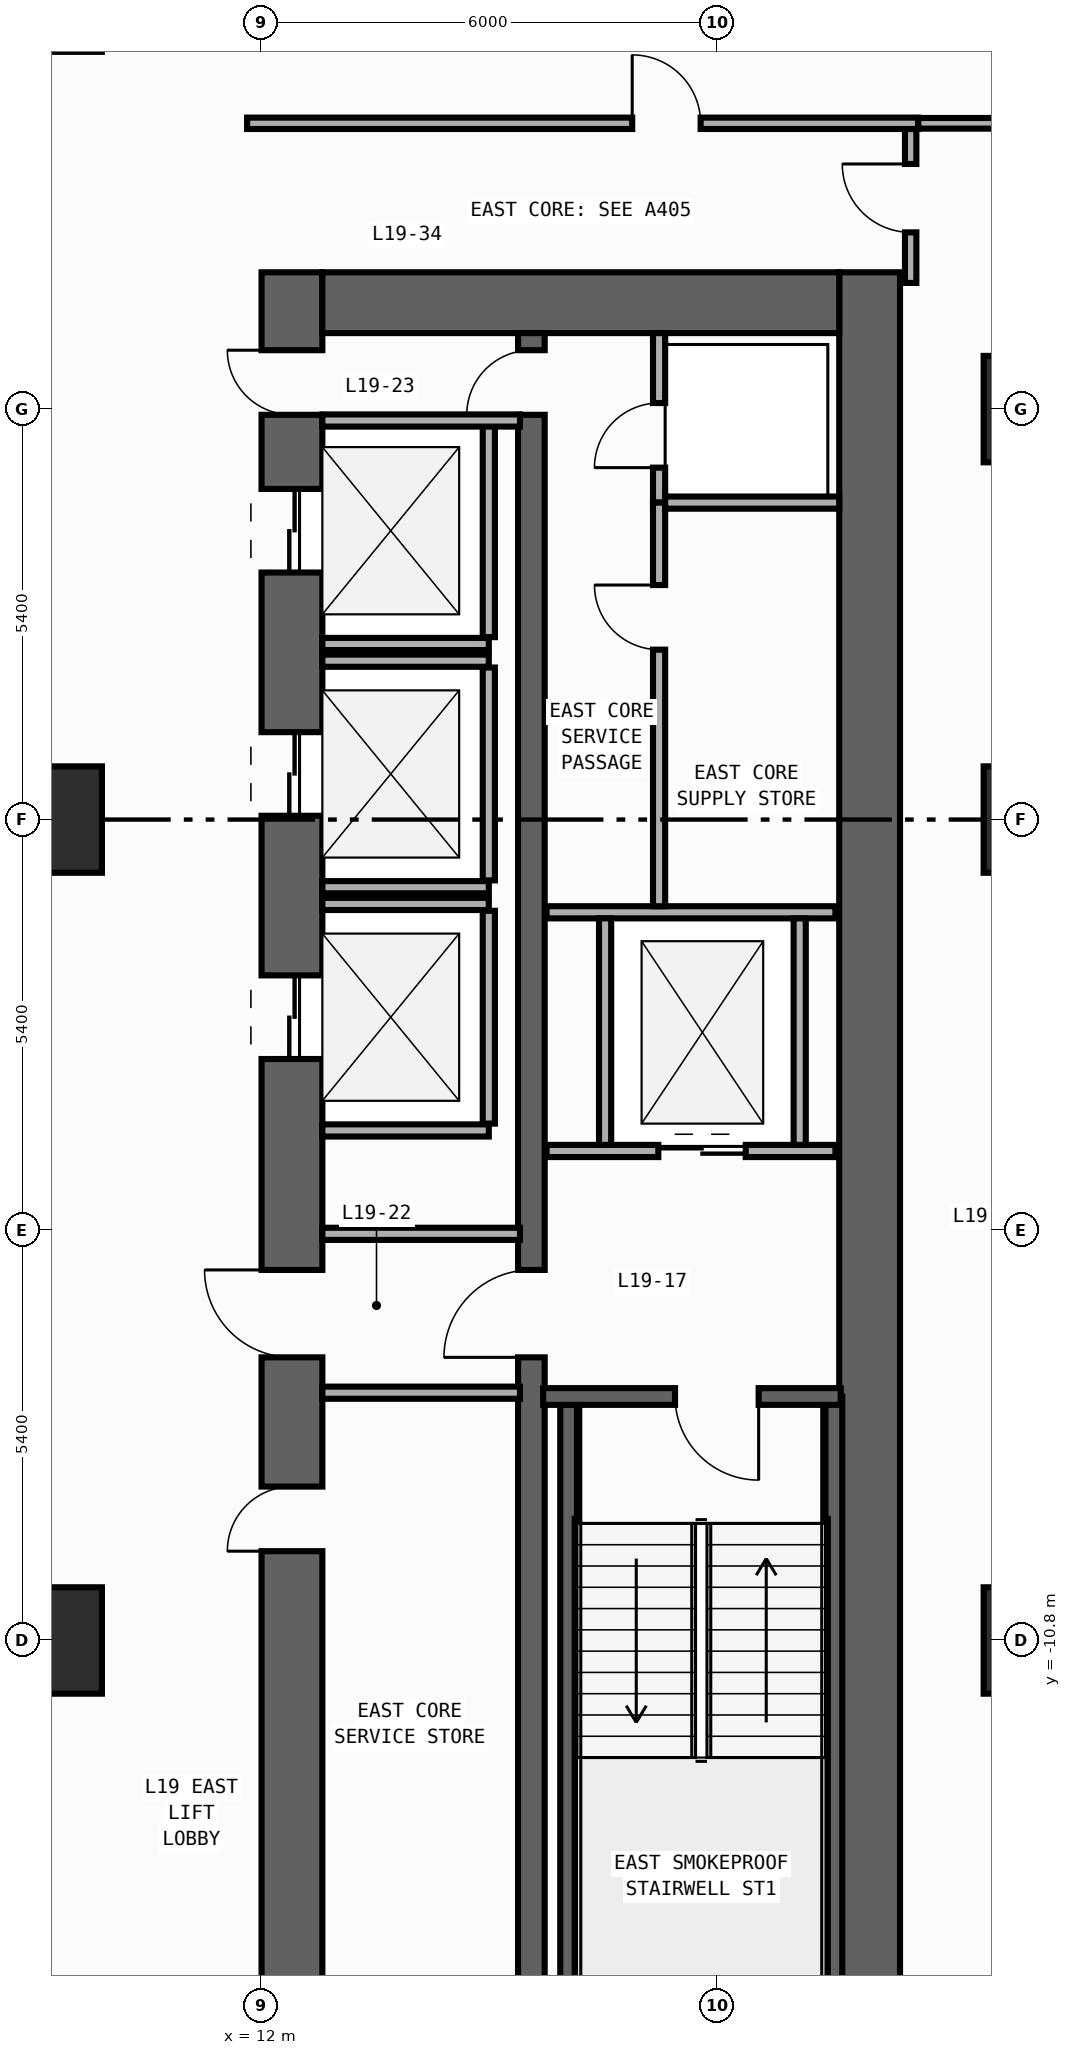
"""IFC4 building model, lengths in metres.
Left out: names, types, materials, properties, quantities, classifications, styles, units other than length and angle.
Written with IfcOpenShell. Run it as: python <this file> out.ifc"""

import sys

from ifc_helpers import new_model, si_unit, direction, frame, frame_2d, origin, origin_2d, place, context, subcontext, project, spatial, rectangle, extrude, element, fill, save


model = new_model("IFC4")
c1 = context("Model", 3, precision=1e-05, world=origin(), true_north=direction((0.0, 1.0)))
c2 = subcontext(c1, "Body", "Model", "MODEL_VIEW")
j1 = project(units=[si_unit("LENGTHUNIT", "METRE"), si_unit("PLANEANGLEUNIT", "RADIAN")], contexts=[c1])
p1 = place(None, origin())
s1 = spatial("IfcSite", under=j1, at=p1, CompositionType="ELEMENT")
p2 = place(p1, origin())
s2 = spatial("IfcBuilding", under=s1, at=p2, CompositionType="ELEMENT")
p3 = place(p2, frame((0.0, 0.0, 80.6)))
s3 = spatial("IfcBuildingStorey", under=s2, at=p3, CompositionType="ELEMENT", Elevation=80.6)
p4 = place(p3, frame((12.4, -19.8, 0.0), z_axis=(0.0, 0.0, 1.0), x_axis=(0.0, 1.0, 0.0)))
e1 = element("IfcWall", 1, at=p4, inside=s3, PredefinedType="SHEAR", context=c2, shape_type="SweptSolid", body=[
    extrude(rectangle(XDim=27.0, YDim=0.8, at=frame_2d((13.5, 0.0))), origin(), (0.0, 0.0, 1.0), 3.85),
])
p5 = place(p4, frame((23.05, 0.0, 0.0)))
e2 = element("IfcOpeningElement", 2, at=p5, cuts=e1, PredefinedType="OPENING", context=c2, shape_type="SweptSolid", body=[
    extrude(rectangle(XDim=1.1, YDim=2.2, at=frame_2d((0.55, 1.1))), frame((0.0, 0.41, 0.0), z_axis=(0.0, -1.0, 0.0), x_axis=(1.0, 0.0, 0.0)), (0.0, 0.0, 1.0), 0.82),
])
p6 = place(p4, frame((19.85, 0.0, 0.0)))
e3 = element("IfcOpeningElement", 3, at=p6, cuts=e1, PredefinedType="OPENING", context=c2, shape_type="SweptSolid", body=[
    extrude(rectangle(XDim=1.1, YDim=2.2, at=frame_2d((0.55, 1.1))), frame((0.0, 0.41, 0.0), z_axis=(0.0, -1.0, 0.0), x_axis=(1.0, 0.0, 0.0)), (0.0, 0.0, 1.0), 0.82),
])
p7 = place(p4, frame((16.65, 0.0, 0.0)))
e4 = element("IfcOpeningElement", 4, at=p7, cuts=e1, PredefinedType="OPENING", context=c2, shape_type="SweptSolid", body=[
    extrude(rectangle(XDim=1.1, YDim=2.2, at=frame_2d((0.55, 1.1))), frame((0.0, 0.41, 0.0), z_axis=(0.0, -1.0, 0.0), x_axis=(1.0, 0.0, 0.0)), (0.0, 0.0, 1.0), 0.82),
])
p8 = place(p4, frame((10.175, 0.0, 0.0)))
e5 = element("IfcOpeningElement", 5, at=p8, cuts=e1, PredefinedType="OPENING", context=c2, shape_type="SweptSolid", body=[
    extrude(rectangle(XDim=0.85, YDim=2.1, at=frame_2d((0.425, 1.05))), frame((0.0, 0.41, 0.0), z_axis=(0.0, -1.0, 0.0), x_axis=(1.0, 0.0, 0.0)), (0.0, 0.0, 1.0), 0.82),
])
p9 = place(p4, frame((12.725, 0.0, 0.0)))
e6 = element("IfcOpeningElement", 6, at=p9, cuts=e1, PredefinedType="OPENING", context=c2, shape_type="SweptSolid", body=[
    extrude(rectangle(XDim=1.15, YDim=2.2, at=frame_2d((0.575, 1.1))), frame((0.0, 0.41, 0.0), z_axis=(0.0, -1.0, 0.0), x_axis=(1.0, 0.0, 0.0)), (0.0, 0.0, 1.0), 0.82),
])
p10 = place(p4, frame((25.125, 0.0, 0.0)))
e7 = element("IfcOpeningElement", 7, at=p10, cuts=e1, PredefinedType="OPENING", context=c2, shape_type="SweptSolid", body=[
    extrude(rectangle(XDim=0.85, YDim=2.1, at=frame_2d((0.425, 1.05))), frame((0.0, 0.41, 0.0), z_axis=(0.0, -1.0, 0.0), x_axis=(1.0, 0.0, 0.0)), (0.0, 0.0, 1.0), 0.82),
])
p11 = place(p3, frame((20.0, -19.8, 0.0), z_axis=(0.0, 0.0, 1.0), x_axis=(0.0, 1.0, 0.0)))
e8 = element("IfcWall", 8, at=p11, inside=s3, PredefinedType="SHEAR", context=c2, shape_type="SweptSolid", body=[
    extrude(rectangle(XDim=27.0, YDim=0.8, at=frame_2d((13.5, 0.0))), origin(), (0.0, 0.0, 1.0), 3.85),
])
p12 = place(p3, frame((12.8, 6.8, 0.0), z_axis=(0.0, 0.0, 1.0), x_axis=(1.0, 0.0, 0.0)))
e9 = element("IfcWall", 9, at=p12, inside=s3, PredefinedType="SHEAR", context=c2, shape_type="SweptSolid", body=[
    extrude(rectangle(XDim=6.8, YDim=0.8, at=frame_2d((3.4, 0.0))), origin(), (0.0, 0.0, 1.0), 3.85),
])
p13 = place(p3, frame((15.55, -19.0, 0.0), z_axis=(0.0, 0.0, 1.0), x_axis=(0.0, 1.0, 0.0)))
e10 = element("IfcWall", 10, at=p13, inside=s3, PredefinedType="SHEAR", context=c2, shape_type="SweptSolid", body=[
    extrude(rectangle(XDim=25.4, YDim=0.35, at=frame_2d((12.7, 0.0))), origin(), (0.0, 0.0, 1.0), 3.85),
])
p14 = place(p13, frame((11.925, 0.0, 0.0)))
e11 = element("IfcOpeningElement", 11, at=p14, cuts=e10, PredefinedType="OPENING", context=c2, shape_type="SweptSolid", body=[
    extrude(rectangle(XDim=1.15, YDim=2.2, at=frame_2d((0.575, 1.1))), frame((0.0, 0.185, 0.0), z_axis=(0.0, -1.0, 0.0), x_axis=(1.0, 0.0, 0.0)), (0.0, 0.0, 1.0), 0.37),
])
p15 = place(p13, frame((24.325, 0.0, 0.0)))
e12 = element("IfcOpeningElement", 12, at=p15, cuts=e10, PredefinedType="OPENING", context=c2, shape_type="SweptSolid", body=[
    extrude(rectangle(XDim=0.85, YDim=2.1, at=frame_2d((0.425, 1.05))), frame((0.0, 0.185, 0.0), z_axis=(0.0, -1.0, 0.0), x_axis=(1.0, 0.0, 0.0)), (0.0, 0.0, 1.0), 0.37),
])
for number, where, z_axis, x_axis in (
    (13, (16.04, -18.89, 0.0), (0.0, 0.0, 1.0), (0.0, 1.0, 0.0)),
    (14, (19.53, -18.89, 0.0), (0.0, 0.0, 1.0), (0.0, 1.0, 0.0)),
):
    element("IfcWall", number, at=place(p3, frame(where, z_axis=z_axis, x_axis=x_axis)), inside=s3, PredefinedType="SHEAR", context=c2, shape_type="SweptSolid", body=[
        extrude(rectangle(XDim=11.3, YDim=0.22, at=frame_2d((5.65, 0.0))), origin(), (0.0, 0.0, 1.0), 3.85),
    ])
p16 = place(p3, frame((19.62, -7.59, 0.0), z_axis=(0.0, 0.0, 1.0), x_axis=(-1.0, 0.0, 0.0)))
e15 = element("IfcWall", 15, at=p16, inside=s3, PredefinedType="SHEAR", context=c2, shape_type="SweptSolid", body=[
    extrude(rectangle(XDim=3.915, YDim=0.22, at=frame_2d((1.958, 0.0))), origin(), (0.0, 0.0, 1.0), 3.85),
])
p17 = place(p16, frame((1.08, 0.0, 0.0)))
e16 = element("IfcOpeningElement", 16, at=p17, cuts=e15, PredefinedType="OPENING", context=c2, shape_type="SweptSolid", body=[
    extrude(rectangle(XDim=1.1, YDim=2.2, at=frame_2d((0.55, 1.1))), frame((0.0, 0.12, 0.0), z_axis=(0.0, -1.0, 0.0), x_axis=(1.0, 0.0, 0.0)), (0.0, 0.0, 1.0), 0.24),
])
for number, where, z_axis, x_axis in (
    (17, (9.2, -10.8, 0.0), (0.0, 0.0, 1.0), (1.0, 0.0, 0.0)),
    (18, (9.2, 0.0, 0.0), (0.0, 0.0, 1.0), (1.0, 0.0, 0.0)),
    (19, (22.2, -10.8, 0.0), (0.0, 0.0, 1.0), (1.0, 0.0, 0.0)),
    (20, (22.2, 0.0, 0.0), (0.0, 0.0, 1.0), (1.0, 0.0, 0.0)),
    (21, (22.2, 5.4, 0.0), (0.0, 0.0, 1.0), (1.0, 0.0, 0.0)),
):
    element("IfcColumn", number, at=place(p3, frame(where, z_axis=z_axis, x_axis=x_axis)), inside=s3, PredefinedType="COLUMN", context=c2, shape_type="SweptSolid", body=[
        extrude(rectangle(XDim=1.4, YDim=1.4, at=origin_2d()), origin(), (0.0, 0.0, 1.0), 4.2),
    ])
p18 = place(p3, frame((12.8, 2.31, 0.0), z_axis=(0.0, 0.0, 1.0), x_axis=(1.0, 0.0, 0.0)))
e22 = element("IfcWall", 22, at=p18, inside=s3, PredefinedType="STANDARD", context=c2, shape_type="SweptSolid", body=[
    extrude(rectangle(XDim=2.19, YDim=0.16, at=frame_2d((1.095, 0.0))), origin(), (0.0, 0.0, 1.0), 3.85),
])
p19 = place(p3, frame((14.99, 2.4, 0.0), z_axis=(0.0, 0.0, 1.0), x_axis=(0.0, 1.0, 0.0)))
e23 = element("IfcWall", 23, at=p19, inside=s3, PredefinedType="STANDARD", context=c2, shape_type="SweptSolid", body=[
    extrude(rectangle(XDim=2.8, YDim=0.16, at=frame_2d((1.4, 0.0))), origin(), (0.0, 0.0, 1.0), 3.85),
])
for number, where, z_axis, x_axis in (
    (24, (12.8, -0.89, 0.0), (0.0, 0.0, 1.0), (1.0, 0.0, 0.0)),
    (25, (12.8, 2.09, 0.0), (0.0, 0.0, 1.0), (1.0, 0.0, 0.0)),
):
    element("IfcWall", number, at=place(p3, frame(where, z_axis=z_axis, x_axis=x_axis)), inside=s3, PredefinedType="STANDARD", context=c2, shape_type="SweptSolid", body=[
        extrude(rectangle(XDim=2.19, YDim=0.16, at=frame_2d((1.095, 0.0))), origin(), (0.0, 0.0, 1.0), 3.85),
    ])
p20 = place(p3, frame((14.99, -0.8, 0.0), z_axis=(0.0, 0.0, 1.0), x_axis=(0.0, 1.0, 0.0)))
e26 = element("IfcWall", 26, at=p20, inside=s3, PredefinedType="STANDARD", context=c2, shape_type="SweptSolid", body=[
    extrude(rectangle(XDim=2.8, YDim=0.16, at=frame_2d((1.4, 0.0))), origin(), (0.0, 0.0, 1.0), 3.85),
])
for number, where, z_axis, x_axis in (
    (27, (12.8, -4.09, 0.0), (0.0, 0.0, 1.0), (1.0, 0.0, 0.0)),
    (28, (12.8, -1.11, 0.0), (0.0, 0.0, 1.0), (1.0, 0.0, 0.0)),
):
    element("IfcWall", number, at=place(p3, frame(where, z_axis=z_axis, x_axis=x_axis)), inside=s3, PredefinedType="STANDARD", context=c2, shape_type="SweptSolid", body=[
        extrude(rectangle(XDim=2.19, YDim=0.16, at=frame_2d((1.095, 0.0))), origin(), (0.0, 0.0, 1.0), 3.85),
    ])
p21 = place(p3, frame((14.99, -4.0, 0.0), z_axis=(0.0, 0.0, 1.0), x_axis=(0.0, 1.0, 0.0)))
e29 = element("IfcWall", 29, at=p21, inside=s3, PredefinedType="STANDARD", context=c2, shape_type="SweptSolid", body=[
    extrude(rectangle(XDim=2.8, YDim=0.16, at=frame_2d((1.4, 0.0))), origin(), (0.0, 0.0, 1.0), 3.85),
])
p22 = place(p3, frame((15.75, -4.36, 0.0), z_axis=(0.0, 0.0, 1.0), x_axis=(1.0, 0.0, 0.0)))
e30 = element("IfcWall", 30, at=p22, inside=s3, PredefinedType="STANDARD", context=c2, shape_type="SweptSolid", body=[
    extrude(rectangle(XDim=3.8, YDim=0.16, at=frame_2d((1.9, 0.0))), origin(), (0.0, 0.0, 1.0), 3.85),
])
p23 = place(p22, frame((1.47, 0.0, 0.0)))
e31 = element("IfcOpeningElement", 31, at=p23, cuts=e30, PredefinedType="OPENING", context=c2, shape_type="SweptSolid", body=[
    extrude(rectangle(XDim=1.15, YDim=2.2, at=frame_2d((0.575, 1.1))), frame((0.0, 0.09, 0.0), z_axis=(0.0, -1.0, 0.0), x_axis=(1.0, 0.0, 0.0)), (0.0, 0.0, 1.0), 0.18),
])
p24 = place(p3, frame((15.75, -1.22, 0.0), z_axis=(0.0, 0.0, 1.0), x_axis=(1.0, 0.0, 0.0)))
e32 = element("IfcWall", 32, at=p24, inside=s3, PredefinedType="STANDARD", context=c2, shape_type="SweptSolid", body=[
    extrude(rectangle(XDim=3.8, YDim=0.16, at=frame_2d((1.9, 0.0))), origin(), (0.0, 0.0, 1.0), 3.85),
])
for number, where, z_axis, x_axis in (
    (33, (16.52, -4.28, 0.0), (0.0, 0.0, 1.0), (0.0, 1.0, 0.0)),
    (34, (19.08, -4.28, 0.0), (0.0, 0.0, 1.0), (0.0, 1.0, 0.0)),
):
    element("IfcWall", number, at=place(p3, frame(where, z_axis=z_axis, x_axis=x_axis)), inside=s3, PredefinedType="STANDARD", context=c2, shape_type="SweptSolid", body=[
        extrude(rectangle(XDim=2.98, YDim=0.16, at=frame_2d((1.49, 0.0))), origin(), (0.0, 0.0, 1.0), 3.85),
    ])
for number, where, z_axis, x_axis in (
    (35, (12.8, -5.45, 0.0), (0.0, 0.0, 1.0), (1.0, 0.0, 0.0)),
    (36, (12.8, -7.54, 0.0), (0.0, 0.0, 1.0), (1.0, 0.0, 0.0)),
    (37, (12.8, 5.25, 0.0), (0.0, 0.0, 1.0), (1.0, 0.0, 0.0)),
):
    element("IfcWall", number, at=place(p3, frame(where, z_axis=z_axis, x_axis=x_axis)), inside=s3, PredefinedType="STANDARD", context=c2, shape_type="SweptSolid", body=[
        extrude(rectangle(XDim=2.6, YDim=0.16, at=frame_2d((1.3, 0.0))), origin(), (0.0, 0.0, 1.0), 3.85),
    ])
p25 = place(p3, frame((17.23, 4.17, 0.0), z_axis=(0.0, 0.0, 1.0), x_axis=(0.0, 1.0, 0.0)))
e38 = element("IfcWall", 38, at=p25, inside=s3, PredefinedType="PARTITIONING", context=c2, shape_type="SweptSolid", body=[
    extrude(rectangle(XDim=2.23, YDim=0.16, at=frame_2d((1.115, 0.0))), origin(), (0.0, 0.0, 1.0), 3.85),
])
p26 = place(p25, frame((0.46, 0.0, 0.0)))
e39 = element("IfcOpeningElement", 39, at=p26, cuts=e38, PredefinedType="OPENING", context=c2, shape_type="SweptSolid", body=[
    extrude(rectangle(XDim=0.85, YDim=2.1, at=frame_2d((0.425, 1.05))), frame((0.0, 0.09, 0.0), z_axis=(0.0, -1.0, 0.0), x_axis=(1.0, 0.0, 0.0)), (0.0, 0.0, 1.0), 0.18),
])
p27 = place(p3, frame((17.23, -1.14, 0.0), z_axis=(0.0, 0.0, 1.0), x_axis=(0.0, 1.0, 0.0)))
e40 = element("IfcWall", 40, at=p27, inside=s3, PredefinedType="PARTITIONING", context=c2, shape_type="SweptSolid", body=[
    extrude(rectangle(XDim=5.31, YDim=0.16, at=frame_2d((2.655, 0.0))), origin(), (0.0, 0.0, 1.0), 3.85),
])
p28 = place(p27, frame((3.375, 0.0, 0.0)))
e41 = element("IfcOpeningElement", 41, at=p28, cuts=e40, PredefinedType="OPENING", context=c2, shape_type="SweptSolid", body=[
    extrude(rectangle(XDim=0.85, YDim=2.1, at=frame_2d((0.425, 1.05))), frame((0.0, 0.09, 0.0), z_axis=(0.0, -1.0, 0.0), x_axis=(1.0, 0.0, 0.0)), (0.0, 0.0, 1.0), 0.18),
])
p29 = place(p3, frame((17.31, 4.17, 0.0), z_axis=(0.0, 0.0, 1.0), x_axis=(1.0, 0.0, 0.0)))
e42 = element("IfcWall", 42, at=p29, inside=s3, PredefinedType="PARTITIONING", context=c2, shape_type="SweptSolid", body=[
    extrude(rectangle(XDim=2.29, YDim=0.16, at=frame_2d((1.145, 0.0))), origin(), (0.0, 0.0, 1.0), 3.85),
])
p30 = place(p3, frame((20.54, 7.06, 0.0), z_axis=(0.0, 0.0, 1.0), x_axis=(0.0, 1.0, 0.0)))
e43 = element("IfcWall", 43, at=p30, inside=s3, PredefinedType="PARTITIONING", context=c2, shape_type="SweptSolid", body=[
    extrude(rectangle(XDim=2.025, YDim=0.15, at=frame_2d((1.012, 0.0))), origin(), (0.0, 0.0, 1.0), 3.85),
])
p31 = place(p30, frame((0.665, 0.0, 0.0)))
e44 = element("IfcOpeningElement", 44, at=p31, cuts=e43, PredefinedType="OPENING", context=c2, shape_type="SweptSolid", body=[
    extrude(rectangle(XDim=0.9, YDim=2.15, at=frame_2d((0.45, 1.075))), frame((0.0, 0.085, 0.0), z_axis=(0.0, -1.0, 0.0), x_axis=(1.0, 0.0, 0.0)), (0.0, 0.0, 1.0), 0.17),
])
p32 = place(p3, frame((11.81, 9.16, 0.0), z_axis=(0.0, 0.0, 1.0), x_axis=(1.0, 0.0, 0.0)))
e45 = element("IfcWall", 45, at=p32, inside=s3, PredefinedType="PARTITIONING", context=c2, shape_type="SweptSolid", body=[
    extrude(rectangle(XDim=8.83, YDim=0.15, at=frame_2d((4.415, 0.0))), origin(), (0.0, 0.0, 1.0), 3.85),
])
p33 = place(p32, frame((5.067, 0.0, 0.0)))
e46 = element("IfcOpeningElement", 46, at=p33, cuts=e45, PredefinedType="OPENING", context=c2, shape_type="SweptSolid", body=[
    extrude(rectangle(XDim=0.9, YDim=2.15, at=frame_2d((0.45, 1.075))), frame((0.0, 0.085, 0.0), z_axis=(0.0, -1.0, 0.0), x_axis=(1.0, 0.0, 0.0)), (0.0, 0.0, 1.0), 0.17),
])
p34 = place(p3, frame((20.64, 9.16, 0.0), z_axis=(0.0, 0.0, 1.0), x_axis=(1.0, 0.0, 0.0)))
e47 = element("IfcWall", 47, at=p34, inside=s3, PredefinedType="PARTITIONING", context=c2, shape_type="SweptSolid", body=[
    extrude(rectangle(XDim=3.415, YDim=0.14, at=frame_2d((1.708, 0.0))), origin(), (0.0, 0.0, 1.0), 3.85),
])
p35 = place(p17, origin())
e48 = element("IfcDoor", 48, at=p35, inside=s3, OperationType="SINGLE_SWING_LEFT", PredefinedType="DOOR", context=c2, shape_type="SweptSolid", body=[
    extrude(rectangle(XDim=1.1, YDim=2.2, at=frame_2d((0.55, 1.1))), frame((0.0, 0.025, 0.0), z_axis=(0.0, -1.0, 0.0), x_axis=(1.0, 0.0, 0.0)), (0.0, 0.0, 1.0), 0.05),
])
fill(e16, e48)
p36 = place(p5, origin())
e49 = element("IfcDoor", 49, at=p36, inside=s3, OperationType="DOUBLE_DOOR_SLIDING", PredefinedType="DOOR", context=c2, shape_type="SweptSolid", body=[
    extrude(rectangle(XDim=1.1, YDim=2.2, at=frame_2d((0.55, 1.1))), frame((0.0, 0.025, 0.0), z_axis=(0.0, -1.0, 0.0), x_axis=(1.0, 0.0, 0.0)), (0.0, 0.0, 1.0), 0.05),
])
fill(e2, e49)
p37 = place(p6, origin())
e50 = element("IfcDoor", 50, at=p37, inside=s3, OperationType="DOUBLE_DOOR_SLIDING", PredefinedType="DOOR", context=c2, shape_type="SweptSolid", body=[
    extrude(rectangle(XDim=1.1, YDim=2.2, at=frame_2d((0.55, 1.1))), frame((0.0, 0.025, 0.0), z_axis=(0.0, -1.0, 0.0), x_axis=(1.0, 0.0, 0.0)), (0.0, 0.0, 1.0), 0.05),
])
fill(e3, e50)
p38 = place(p7, origin())
e51 = element("IfcDoor", 51, at=p38, inside=s3, OperationType="DOUBLE_DOOR_SLIDING", PredefinedType="DOOR", context=c2, shape_type="SweptSolid", body=[
    extrude(rectangle(XDim=1.1, YDim=2.2, at=frame_2d((0.55, 1.1))), frame((0.0, 0.025, 0.0), z_axis=(0.0, -1.0, 0.0), x_axis=(1.0, 0.0, 0.0)), (0.0, 0.0, 1.0), 0.05),
])
fill(e4, e51)
p39 = place(p8, origin())
e52 = element("IfcDoor", 52, at=p39, inside=s3, OperationType="SINGLE_SWING_LEFT", PredefinedType="DOOR", context=c2, shape_type="SweptSolid", body=[
    extrude(rectangle(XDim=0.85, YDim=2.1, at=frame_2d((0.425, 1.05))), frame((0.0, 0.025, 0.0), z_axis=(0.0, -1.0, 0.0), x_axis=(1.0, 0.0, 0.0)), (0.0, 0.0, 1.0), 0.05),
])
fill(e5, e52)
p40 = place(p9, origin())
e53 = element("IfcDoor", 53, at=p40, inside=s3, OperationType="SINGLE_SWING_RIGHT", PredefinedType="DOOR", context=c2, shape_type="SweptSolid", body=[
    extrude(rectangle(XDim=1.15, YDim=2.2, at=frame_2d((0.575, 1.1))), frame((0.0, 0.025, 0.0), z_axis=(0.0, -1.0, 0.0), x_axis=(1.0, 0.0, 0.0)), (0.0, 0.0, 1.0), 0.05),
])
fill(e6, e53)
p41 = place(p14, origin())
e54 = element("IfcDoor", 54, at=p41, inside=s3, OperationType="SINGLE_SWING_LEFT", PredefinedType="DOOR", context=c2, shape_type="SweptSolid", body=[
    extrude(rectangle(XDim=1.15, YDim=2.2, at=frame_2d((0.575, 1.1))), frame((0.0, 0.025, 0.0), z_axis=(0.0, -1.0, 0.0), x_axis=(1.0, 0.0, 0.0)), (0.0, 0.0, 1.0), 0.05),
])
fill(e11, e54)
p42 = place(p10, origin())
e55 = element("IfcDoor", 55, at=p42, inside=s3, OperationType="SINGLE_SWING_RIGHT", PredefinedType="DOOR", context=c2, shape_type="SweptSolid", body=[
    extrude(rectangle(XDim=0.85, YDim=2.1, at=frame_2d((0.425, 1.05))), frame((0.0, 0.025, 0.0), z_axis=(0.0, -1.0, 0.0), x_axis=(1.0, 0.0, 0.0)), (0.0, 0.0, 1.0), 0.05),
])
fill(e7, e55)
p43 = place(p15, origin())
e56 = element("IfcDoor", 56, at=p43, inside=s3, OperationType="SINGLE_SWING_LEFT", PredefinedType="DOOR", context=c2, shape_type="SweptSolid", body=[
    extrude(rectangle(XDim=0.85, YDim=2.1, at=frame_2d((0.425, 1.05))), frame((0.0, 0.025, 0.0), z_axis=(0.0, -1.0, 0.0), x_axis=(1.0, 0.0, 0.0)), (0.0, 0.0, 1.0), 0.05),
])
fill(e12, e56)
p44 = place(p23, origin())
e57 = element("IfcDoor", 57, at=p44, inside=s3, OperationType="DOUBLE_DOOR_SLIDING", PredefinedType="DOOR", context=c2, shape_type="SweptSolid", body=[
    extrude(rectangle(XDim=1.15, YDim=2.2, at=frame_2d((0.575, 1.1))), frame((0.0, 0.025, 0.0), z_axis=(0.0, -1.0, 0.0), x_axis=(1.0, 0.0, 0.0)), (0.0, 0.0, 1.0), 0.05),
])
fill(e31, e57)
p45 = place(p26, origin())
e58 = element("IfcDoor", 58, at=p45, inside=s3, OperationType="SINGLE_SWING_LEFT", PredefinedType="DOOR", context=c2, shape_type="SweptSolid", body=[
    extrude(rectangle(XDim=0.85, YDim=2.1, at=frame_2d((0.425, 1.05))), frame((0.0, 0.025, 0.0), z_axis=(0.0, -1.0, 0.0), x_axis=(1.0, 0.0, 0.0)), (0.0, 0.0, 1.0), 0.05),
])
fill(e39, e58)
p46 = place(p28, origin())
e59 = element("IfcDoor", 59, at=p46, inside=s3, OperationType="SINGLE_SWING_RIGHT", PredefinedType="DOOR", context=c2, shape_type="SweptSolid", body=[
    extrude(rectangle(XDim=0.85, YDim=2.1, at=frame_2d((0.425, 1.05))), frame((0.0, 0.025, 0.0), z_axis=(0.0, -1.0, 0.0), x_axis=(1.0, 0.0, 0.0)), (0.0, 0.0, 1.0), 0.05),
])
fill(e41, e59)
p47 = place(p31, origin())
e60 = element("IfcDoor", 60, at=p47, inside=s3, OperationType="SINGLE_SWING_RIGHT", PredefinedType="DOOR", context=c2, shape_type="SweptSolid", body=[
    extrude(rectangle(XDim=0.9, YDim=2.15, at=frame_2d((0.45, 1.075))), frame((0.0, 0.025, 0.0), z_axis=(0.0, -1.0, 0.0), x_axis=(1.0, 0.0, 0.0)), (0.0, 0.0, 1.0), 0.05),
])
fill(e44, e60)
p48 = place(p33, origin())
e61 = element("IfcDoor", 61, at=p48, inside=s3, OperationType="SINGLE_SWING_LEFT", PredefinedType="DOOR", context=c2, shape_type="SweptSolid", body=[
    extrude(rectangle(XDim=0.9, YDim=2.15, at=frame_2d((0.45, 1.075))), frame((0.0, 0.025, 0.0), z_axis=(0.0, -1.0, 0.0), x_axis=(1.0, 0.0, 0.0)), (0.0, 0.0, 1.0), 0.05),
])
fill(e46, e61)
save(model, sys.argv[1])
